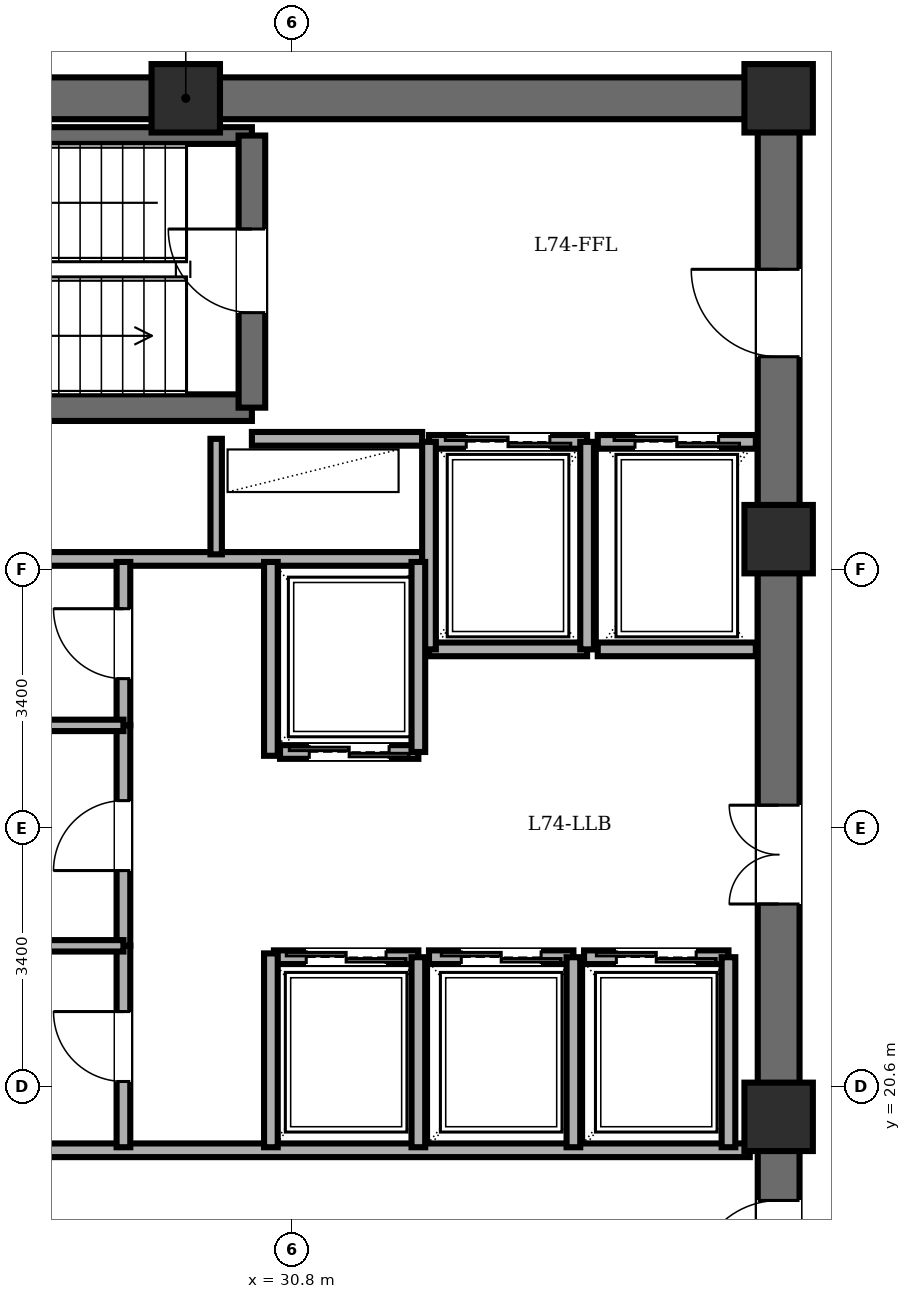
"""IFC4 building model, lengths in metres.
Left out: names, types, materials, properties, quantities, classifications, styles, units other than length and angle.
Written with IfcOpenShell. Run it as: python <this file> out.ifc"""

import sys

from ifc_helpers import new_model, si_unit, direction, frame, frame_2d, origin, origin_2d, place, context, subcontext, project, spatial, rectangle, extrude, element, fill, save


model = new_model("IFC4")
c1 = context("Model", 3, precision=1e-05, world=origin(), true_north=direction((0.0, 1.0)))
c2 = subcontext(c1, "Body", "Model", "MODEL_VIEW")
j1 = project(units=[si_unit("LENGTHUNIT", "METRE"), si_unit("PLANEANGLEUNIT", "RADIAN")], contexts=[c1])
p1 = place(None, origin())
s1 = spatial("IfcSite", under=j1, at=p1, CompositionType="ELEMENT")
p2 = place(p1, origin())
s2 = spatial("IfcBuilding", under=s1, at=p2, CompositionType="ELEMENT")
p3 = place(p2, frame((0.0, 0.0, 284.35)))
s3 = spatial("IfcBuildingStorey", under=s2, at=p3, CompositionType="ELEMENT", Elevation=284.35)
for number, where, z_axis, x_axis in (
    (1, (37.2, 20.2, 0.0), (0.0, 0.0, 1.0), (1.0, 0.0, 0.0)),
    (2, (37.2, 27.8, 0.0), (0.0, 0.0, 1.0), (1.0, 0.0, 0.0)),
    (3, (37.2, 33.6, 0.0), (0.0, 0.0, 1.0), (1.0, 0.0, 0.0)),
    (4, (29.4, 33.6, 0.0), (0.0, 0.0, 1.0), (1.0, 0.0, 0.0)),
):
    element("IfcColumn", number, at=place(p3, frame(where, z_axis=z_axis, x_axis=x_axis)), inside=s3, PredefinedType="COLUMN", context=c2, shape_type="SweptSolid", body=[
        extrude(rectangle(XDim=0.9, YDim=0.9, at=origin_2d()), origin(), (0.0, 0.0, 1.0), 3.65),
    ])
p4 = place(p3, frame((21.6, 33.6, 0.0), z_axis=(0.0, 0.0, 1.0), x_axis=(1.0, 0.0, 0.0)))
e5 = element("IfcWall", 5, at=p4, inside=s3, PredefinedType="SHEAR", context=c2, shape_type="SweptSolid", body=[
    extrude(rectangle(XDim=15.6, YDim=0.55, at=frame_2d((7.8, 0.0))), origin(), (0.0, 0.0, 1.0), 3.45),
])
p5 = place(p3, frame((37.2, 14.4, 0.0), z_axis=(0.0, 0.0, 1.0), x_axis=(0.0, 1.0, 0.0)))
e6 = element("IfcWall", 6, at=p5, inside=s3, PredefinedType="SHEAR", context=c2, shape_type="SweptSolid", body=[
    extrude(rectangle(XDim=19.2, YDim=0.55, at=frame_2d((9.6, 0.0))), origin(), (0.0, 0.0, 1.0), 3.45),
])
p6 = place(p5, frame((15.8, 0.0, 0.0)))
e7 = element("IfcOpeningElement", 7, at=p6, cuts=e6, PredefinedType="OPENING", context=c2, shape_type="SweptSolid", body=[
    extrude(rectangle(XDim=1.15, YDim=2.15, at=frame_2d((0.575, 1.075))), frame((0.0, 0.285, 0.0), z_axis=(0.0, -1.0, 0.0), x_axis=(1.0, 0.0, 0.0)), (0.0, 0.0, 1.0), 0.57),
])
p7 = place(p5, frame((3.6, 0.0, 0.0)))
e8 = element("IfcOpeningElement", 8, at=p7, cuts=e6, PredefinedType="OPENING", context=c2, shape_type="SweptSolid", body=[
    extrude(rectangle(XDim=1.1, YDim=2.15, at=frame_2d((0.55, 1.075))), frame((0.0, 0.285, 0.0), z_axis=(0.0, -1.0, 0.0), x_axis=(1.0, 0.0, 0.0)), (0.0, 0.0, 1.0), 0.57),
])
p8 = place(p5, frame((8.6, 0.0, 0.0)))
e9 = element("IfcOpeningElement", 9, at=p8, cuts=e6, PredefinedType="OPENING", context=c2, shape_type="SweptSolid", body=[
    extrude(rectangle(XDim=1.3, YDim=2.2, at=frame_2d((0.65, 1.1))), frame((0.0, 0.285, 0.0), z_axis=(0.0, -1.0, 0.0), x_axis=(1.0, 0.0, 0.0)), (0.0, 0.0, 1.0), 0.57),
])
p9 = place(p3, frame((22.48, 29.53, 0.0), z_axis=(0.0, 0.0, 1.0), x_axis=(1.0, 0.0, 0.0)))
e10 = element("IfcWall", 10, at=p9, inside=s3, PredefinedType="SOLIDWALL", context=c2, shape_type="SweptSolid", body=[
    extrude(rectangle(XDim=7.79, YDim=0.35, at=frame_2d((3.895, 0.0))), origin(), (0.0, 0.0, 1.0), 3.45),
])
p10 = place(p3, frame((22.48, 33.11, 0.0), z_axis=(0.0, 0.0, 1.0), x_axis=(1.0, 0.0, 0.0)))
e11 = element("IfcWall", 11, at=p10, inside=s3, PredefinedType="PARTITIONING", context=c2, shape_type="SweptSolid", body=[
    extrude(rectangle(XDim=7.79, YDim=0.22, at=frame_2d((3.895, 0.0))), origin(), (0.0, 0.0, 1.0), 3.45),
])
p11 = place(p3, frame((30.27, 29.53, 0.0), z_axis=(0.0, 0.0, 1.0), x_axis=(0.0, 1.0, 0.0)))
e12 = element("IfcWall", 12, at=p11, inside=s3, PredefinedType="SOLIDWALL", context=c2, shape_type="SweptSolid", body=[
    extrude(rectangle(XDim=3.58, YDim=0.35, at=frame_2d((1.79, 0.0))), origin(), (0.0, 0.0, 1.0), 3.45),
])
p12 = place(p11, frame((1.25, 0.0, 0.0)))
e13 = element("IfcOpeningElement", 13, at=p12, cuts=e12, PredefinedType="OPENING", context=c2, shape_type="SweptSolid", body=[
    extrude(rectangle(XDim=1.1, YDim=2.15, at=frame_2d((0.55, 1.075))), frame((0.0, 0.185, 0.0), z_axis=(0.0, -1.0, 0.0), x_axis=(1.0, 0.0, 0.0)), (0.0, 0.0, 1.0), 0.37),
])
p13 = place(p3, frame((30.27, 29.12, 0.0), z_axis=(0.0, 0.0, 1.0), x_axis=(1.0, 0.0, 0.0)))
e14 = element("IfcWall", 14, at=p13, inside=s3, PredefinedType="PARTITIONING", context=c2, shape_type="SweptSolid", body=[
    extrude(rectangle(XDim=2.24, YDim=0.18, at=frame_2d((1.12, 0.0))), origin(), (0.0, 0.0, 1.0), 3.45),
])
p14 = place(p3, frame((21.95, 27.54, 0.0), z_axis=(0.0, 0.0, 1.0), x_axis=(1.0, 0.0, 0.0)))
e15 = element("IfcWall", 15, at=p14, inside=s3, PredefinedType="PARTITIONING", context=c2, shape_type="SweptSolid", body=[
    extrude(rectangle(XDim=10.56, YDim=0.18, at=frame_2d((5.28, 0.0))), origin(), (0.0, 0.0, 1.0), 3.45),
])
p15 = place(p3, frame((29.8, 27.6, 0.0), z_axis=(0.0, 0.0, 1.0), x_axis=(0.0, 1.0, 0.0)))
e16 = element("IfcWall", 16, at=p15, inside=s3, PredefinedType="PARTITIONING", context=c2, shape_type="SweptSolid", body=[
    extrude(rectangle(XDim=1.52, YDim=0.15, at=frame_2d((0.76, 0.0))), origin(), (0.0, 0.0, 1.0), 3.45),
])
p16 = place(p3, frame((21.95, 19.76, 0.0), z_axis=(0.0, 0.0, 1.0), x_axis=(1.0, 0.0, 0.0)))
e17 = element("IfcWall", 17, at=p16, inside=s3, PredefinedType="PARTITIONING", context=c2, shape_type="SweptSolid", body=[
    extrude(rectangle(XDim=14.87, YDim=0.18, at=frame_2d((7.435, 0.0))), origin(), (0.0, 0.0, 1.0), 3.45),
])
p17 = place(p3, frame((32.6, 29.08, 0.0), z_axis=(0.0, 0.0, 1.0), x_axis=(1.0, 0.0, 0.0)))
e18 = element("IfcWall", 18, at=p17, inside=s3, PredefinedType="PARTITIONING", context=c2, shape_type="SweptSolid", body=[
    extrude(rectangle(XDim=2.08, YDim=0.18, at=frame_2d((1.04, 0.0))), origin(), (0.0, 0.0, 1.0), 3.45),
])
p18 = place(p17, frame((0.49, 0.0, 0.0)))
e19 = element("IfcOpeningElement", 19, at=p18, cuts=e18, PredefinedType="OPENING", context=c2, shape_type="SweptSolid", body=[
    extrude(rectangle(XDim=1.1, YDim=2.2, at=frame_2d((0.55, 1.1))), frame((0.0, 0.1, 0.0), z_axis=(0.0, -1.0, 0.0), x_axis=(1.0, 0.0, 0.0)), (0.0, 0.0, 1.0), 0.2),
])
p19 = place(p3, frame((34.68, 26.35, 0.0), z_axis=(0.0, 0.0, 1.0), x_axis=(-1.0, 0.0, 0.0)))
e20 = element("IfcWall", 20, at=p19, inside=s3, PredefinedType="PARTITIONING", context=c2, shape_type="SweptSolid", body=[
    extrude(rectangle(XDim=2.08, YDim=0.18, at=frame_2d((1.04, 0.0))), origin(), (0.0, 0.0, 1.0), 3.45),
])
for number, where, z_axis, x_axis in (
    (21, (34.68, 26.35, 0.0), (0.0, 0.0, 1.0), (0.0, 1.0, 0.0)),
    (22, (32.6, 29.08, 0.0), (0.0, 0.0, 1.0), (0.0, -1.0, 0.0)),
):
    element("IfcWall", number, at=place(p3, frame(where, z_axis=z_axis, x_axis=x_axis)), inside=s3, PredefinedType="PARTITIONING", context=c2, shape_type="SweptSolid", body=[
        extrude(rectangle(XDim=2.73, YDim=0.18, at=frame_2d((1.365, 0.0))), origin(), (0.0, 0.0, 1.0), 3.45),
    ])
p20 = place(p3, frame((34.82, 29.08, 0.0), z_axis=(0.0, 0.0, 1.0), x_axis=(1.0, 0.0, 0.0)))
e23 = element("IfcWall", 23, at=p20, inside=s3, PredefinedType="PARTITIONING", context=c2, shape_type="SweptSolid", body=[
    extrude(rectangle(XDim=2.08, YDim=0.18, at=frame_2d((1.04, 0.0))), origin(), (0.0, 0.0, 1.0), 3.45),
])
p21 = place(p20, frame((0.49, 0.0, 0.0)))
e24 = element("IfcOpeningElement", 24, at=p21, cuts=e23, PredefinedType="OPENING", context=c2, shape_type="SweptSolid", body=[
    extrude(rectangle(XDim=1.1, YDim=2.2, at=frame_2d((0.55, 1.1))), frame((0.0, 0.1, 0.0), z_axis=(0.0, -1.0, 0.0), x_axis=(1.0, 0.0, 0.0)), (0.0, 0.0, 1.0), 0.2),
])
p22 = place(p3, frame((36.9, 26.35, 0.0), z_axis=(0.0, 0.0, 1.0), x_axis=(-1.0, 0.0, 0.0)))
e25 = element("IfcWall", 25, at=p22, inside=s3, PredefinedType="PARTITIONING", context=c2, shape_type="SweptSolid", body=[
    extrude(rectangle(XDim=2.08, YDim=0.18, at=frame_2d((1.04, 0.0))), origin(), (0.0, 0.0, 1.0), 3.45),
])
p23 = place(p3, frame((32.46, 25.0, 0.0), z_axis=(0.0, 0.0, 1.0), x_axis=(-1.0, 0.0, 0.0)))
e26 = element("IfcWall", 26, at=p23, inside=s3, PredefinedType="PARTITIONING", context=c2, shape_type="SweptSolid", body=[
    extrude(rectangle(XDim=1.82, YDim=0.18, at=frame_2d((0.91, 0.0))), origin(), (0.0, 0.0, 1.0), 3.45),
])
p24 = place(p23, frame((0.385, 0.0, 0.0)))
e27 = element("IfcOpeningElement", 27, at=p24, cuts=e26, PredefinedType="OPENING", context=c2, shape_type="SweptSolid", body=[
    extrude(rectangle(XDim=1.05, YDim=2.2, at=frame_2d((0.525, 1.1))), frame((0.0, 0.1, 0.0), z_axis=(0.0, -1.0, 0.0), x_axis=(1.0, 0.0, 0.0)), (0.0, 0.0, 1.0), 0.2),
])
p25 = place(p3, frame((32.46, 25.0, 0.0), z_axis=(0.0, 0.0, 1.0), x_axis=(0.0, 1.0, 0.0)))
e28 = element("IfcWall", 28, at=p25, inside=s3, PredefinedType="PARTITIONING", context=c2, shape_type="SweptSolid", body=[
    extrude(rectangle(XDim=2.5, YDim=0.18, at=frame_2d((1.25, 0.0))), origin(), (0.0, 0.0, 1.0), 3.45),
])
p26 = place(p3, frame((30.56, 22.3, 0.0), z_axis=(0.0, 0.0, 1.0), x_axis=(1.0, 0.0, 0.0)))
e29 = element("IfcWall", 29, at=p26, inside=s3, PredefinedType="PARTITIONING", context=c2, shape_type="SweptSolid", body=[
    extrude(rectangle(XDim=1.9, YDim=0.18, at=frame_2d((0.95, 0.0))), origin(), (0.0, 0.0, 1.0), 3.45),
])
p27 = place(p26, frame((0.425, 0.0, 0.0)))
e30 = element("IfcOpeningElement", 30, at=p27, cuts=e29, PredefinedType="OPENING", context=c2, shape_type="SweptSolid", body=[
    extrude(rectangle(XDim=1.05, YDim=2.2, at=frame_2d((0.525, 1.1))), frame((0.0, 0.1, 0.0), z_axis=(0.0, -1.0, 0.0), x_axis=(1.0, 0.0, 0.0)), (0.0, 0.0, 1.0), 0.2),
])
p28 = place(p3, frame((32.46, 19.8, 0.0), z_axis=(0.0, 0.0, 1.0), x_axis=(0.0, 1.0, 0.0)))
e31 = element("IfcWall", 31, at=p28, inside=s3, PredefinedType="PARTITIONING", context=c2, shape_type="SweptSolid", body=[
    extrude(rectangle(XDim=2.5, YDim=0.18, at=frame_2d((1.25, 0.0))), origin(), (0.0, 0.0, 1.0), 3.45),
])
p29 = place(p3, frame((32.6, 22.3, 0.0), z_axis=(0.0, 0.0, 1.0), x_axis=(1.0, 0.0, 0.0)))
e32 = element("IfcWall", 32, at=p29, inside=s3, PredefinedType="PARTITIONING", context=c2, shape_type="SweptSolid", body=[
    extrude(rectangle(XDim=1.9, YDim=0.18, at=frame_2d((0.95, 0.0))), origin(), (0.0, 0.0, 1.0), 3.45),
])
p30 = place(p29, frame((0.425, 0.0, 0.0)))
e33 = element("IfcOpeningElement", 33, at=p30, cuts=e32, PredefinedType="OPENING", context=c2, shape_type="SweptSolid", body=[
    extrude(rectangle(XDim=1.05, YDim=2.2, at=frame_2d((0.525, 1.1))), frame((0.0, 0.1, 0.0), z_axis=(0.0, -1.0, 0.0), x_axis=(1.0, 0.0, 0.0)), (0.0, 0.0, 1.0), 0.2),
])
p31 = place(p3, frame((34.5, 19.8, 0.0), z_axis=(0.0, 0.0, 1.0), x_axis=(0.0, 1.0, 0.0)))
e34 = element("IfcWall", 34, at=p31, inside=s3, PredefinedType="PARTITIONING", context=c2, shape_type="SweptSolid", body=[
    extrude(rectangle(XDim=2.5, YDim=0.18, at=frame_2d((1.25, 0.0))), origin(), (0.0, 0.0, 1.0), 3.45),
])
p32 = place(p3, frame((34.64, 22.3, 0.0), z_axis=(0.0, 0.0, 1.0), x_axis=(1.0, 0.0, 0.0)))
e35 = element("IfcWall", 35, at=p32, inside=s3, PredefinedType="PARTITIONING", context=c2, shape_type="SweptSolid", body=[
    extrude(rectangle(XDim=1.9, YDim=0.18, at=frame_2d((0.95, 0.0))), origin(), (0.0, 0.0, 1.0), 3.45),
])
p33 = place(p32, frame((0.425, 0.0, 0.0)))
e36 = element("IfcOpeningElement", 36, at=p33, cuts=e35, PredefinedType="OPENING", context=c2, shape_type="SweptSolid", body=[
    extrude(rectangle(XDim=1.05, YDim=2.2, at=frame_2d((0.525, 1.1))), frame((0.0, 0.1, 0.0), z_axis=(0.0, -1.0, 0.0), x_axis=(1.0, 0.0, 0.0)), (0.0, 0.0, 1.0), 0.2),
])
p34 = place(p3, frame((36.54, 19.8, 0.0), z_axis=(0.0, 0.0, 1.0), x_axis=(0.0, 1.0, 0.0)))
e37 = element("IfcWall", 37, at=p34, inside=s3, PredefinedType="PARTITIONING", context=c2, shape_type="SweptSolid", body=[
    extrude(rectangle(XDim=2.5, YDim=0.18, at=frame_2d((1.25, 0.0))), origin(), (0.0, 0.0, 1.0), 3.45),
])
for number, where, z_axis, x_axis in (
    (38, (30.52, 24.95, 0.0), (0.0, 0.0, 1.0), (0.0, 1.0, 0.0)),
    (39, (30.52, 19.8, 0.0), (0.0, 0.0, 1.0), (0.0, 1.0, 0.0)),
):
    element("IfcWall", number, at=place(p3, frame(where, z_axis=z_axis, x_axis=x_axis)), inside=s3, PredefinedType="PARTITIONING", context=c2, shape_type="SweptSolid", body=[
        extrude(rectangle(XDim=2.55, YDim=0.18, at=frame_2d((1.275, 0.0))), origin(), (0.0, 0.0, 1.0), 3.45),
    ])
p35 = place(p3, frame((28.58, 25.35, 0.0), z_axis=(0.0, 0.0, 1.0), x_axis=(0.0, 1.0, 0.0)))
e40 = element("IfcWall", 40, at=p35, inside=s3, PredefinedType="PARTITIONING", context=c2, shape_type="SweptSolid", body=[
    extrude(rectangle(XDim=2.15, YDim=0.18, at=frame_2d((1.075, 0.0))), origin(), (0.0, 0.0, 1.0), 3.45),
])
p36 = place(p35, frame((0.615, 0.0, 0.0)))
e41 = element("IfcOpeningElement", 41, at=p36, cuts=e40, PredefinedType="OPENING", context=c2, shape_type="SweptSolid", body=[
    extrude(rectangle(XDim=0.92, YDim=2.1, at=frame_2d((0.46, 1.05))), frame((0.0, 0.1, 0.0), z_axis=(0.0, -1.0, 0.0), x_axis=(1.0, 0.0, 0.0)), (0.0, 0.0, 1.0), 0.2),
])
p37 = place(p3, frame((28.58, 22.45, 0.0), z_axis=(0.0, 0.0, 1.0), x_axis=(0.0, 1.0, 0.0)))
e42 = element("IfcWall", 42, at=p37, inside=s3, PredefinedType="PARTITIONING", context=c2, shape_type="SweptSolid", body=[
    extrude(rectangle(XDim=2.9, YDim=0.18, at=frame_2d((1.45, 0.0))), origin(), (0.0, 0.0, 1.0), 3.45),
])
p38 = place(p37, frame((0.99, 0.0, 0.0)))
e43 = element("IfcOpeningElement", 43, at=p38, cuts=e42, PredefinedType="OPENING", context=c2, shape_type="SweptSolid", body=[
    extrude(rectangle(XDim=0.92, YDim=2.1, at=frame_2d((0.46, 1.05))), frame((0.0, 0.1, 0.0), z_axis=(0.0, -1.0, 0.0), x_axis=(1.0, 0.0, 0.0)), (0.0, 0.0, 1.0), 0.2),
])
p39 = place(p3, frame((28.58, 19.8, 0.0), z_axis=(0.0, 0.0, 1.0), x_axis=(0.0, 1.0, 0.0)))
e44 = element("IfcWall", 44, at=p39, inside=s3, PredefinedType="PARTITIONING", context=c2, shape_type="SweptSolid", body=[
    extrude(rectangle(XDim=2.65, YDim=0.18, at=frame_2d((1.325, 0.0))), origin(), (0.0, 0.0, 1.0), 3.45),
])
p40 = place(p39, frame((0.865, 0.0, 0.0)))
e45 = element("IfcOpeningElement", 45, at=p40, cuts=e44, PredefinedType="OPENING", context=c2, shape_type="SweptSolid", body=[
    extrude(rectangle(XDim=0.92, YDim=2.1, at=frame_2d((0.46, 1.05))), frame((0.0, 0.1, 0.0), z_axis=(0.0, -1.0, 0.0), x_axis=(1.0, 0.0, 0.0)), (0.0, 0.0, 1.0), 0.2),
])
for number, where, z_axis, x_axis in (
    (46, (21.95, 25.35, 0.0), (0.0, 0.0, 1.0), (1.0, 0.0, 0.0)),
    (47, (21.95, 22.45, 0.0), (0.0, 0.0, 1.0), (1.0, 0.0, 0.0)),
):
    element("IfcWall", number, at=place(p3, frame(where, z_axis=z_axis, x_axis=x_axis)), inside=s3, PredefinedType="PARTITIONING", context=c2, shape_type="SweptSolid", body=[
        extrude(rectangle(XDim=6.63, YDim=0.15, at=frame_2d((3.315, 0.0))), origin(), (0.0, 0.0, 1.0), 3.45),
    ])
p41 = place(p12, origin())
e48 = element("IfcDoor", 48, at=p41, inside=s3, OperationType="SINGLE_SWING_RIGHT", PredefinedType="DOOR", context=c2, shape_type="SweptSolid", body=[
    extrude(rectangle(XDim=1.1, YDim=2.15, at=frame_2d((0.55, 1.075))), frame((0.0, 0.025, 0.0), z_axis=(0.0, -1.0, 0.0), x_axis=(1.0, 0.0, 0.0)), (0.0, 0.0, 1.0), 0.05),
])
fill(e13, e48)
p42 = place(p6, origin())
e49 = element("IfcDoor", 49, at=p42, inside=s3, OperationType="SINGLE_SWING_RIGHT", PredefinedType="DOOR", context=c2, shape_type="SweptSolid", body=[
    extrude(rectangle(XDim=1.15, YDim=2.15, at=frame_2d((0.575, 1.075))), frame((0.0, 0.025, 0.0), z_axis=(0.0, -1.0, 0.0), x_axis=(1.0, 0.0, 0.0)), (0.0, 0.0, 1.0), 0.05),
])
fill(e7, e49)
p43 = place(p7, origin())
e50 = element("IfcDoor", 50, at=p43, inside=s3, OperationType="SINGLE_SWING_LEFT", PredefinedType="DOOR", context=c2, shape_type="SweptSolid", body=[
    extrude(rectangle(XDim=1.1, YDim=2.15, at=frame_2d((0.55, 1.075))), frame((0.0, 0.025, 0.0), z_axis=(0.0, -1.0, 0.0), x_axis=(1.0, 0.0, 0.0)), (0.0, 0.0, 1.0), 0.05),
])
fill(e8, e50)
p44 = place(p18, origin())
e51 = element("IfcDoor", 51, at=p44, inside=s3, OperationType="DOUBLE_DOOR_SLIDING", PredefinedType="DOOR", context=c2, shape_type="SweptSolid", body=[
    extrude(rectangle(XDim=1.1, YDim=2.2, at=frame_2d((0.55, 1.1))), frame((0.0, 0.025, 0.0), z_axis=(0.0, -1.0, 0.0), x_axis=(1.0, 0.0, 0.0)), (0.0, 0.0, 1.0), 0.05),
])
fill(e19, e51)
p45 = place(p21, origin())
e52 = element("IfcDoor", 52, at=p45, inside=s3, OperationType="DOUBLE_DOOR_SLIDING", PredefinedType="DOOR", context=c2, shape_type="SweptSolid", body=[
    extrude(rectangle(XDim=1.1, YDim=2.2, at=frame_2d((0.55, 1.1))), frame((0.0, 0.025, 0.0), z_axis=(0.0, -1.0, 0.0), x_axis=(1.0, 0.0, 0.0)), (0.0, 0.0, 1.0), 0.05),
])
fill(e24, e52)
p46 = place(p24, origin())
e53 = element("IfcDoor", 53, at=p46, inside=s3, OperationType="DOUBLE_DOOR_SLIDING", PredefinedType="DOOR", context=c2, shape_type="SweptSolid", body=[
    extrude(rectangle(XDim=1.05, YDim=2.2, at=frame_2d((0.525, 1.1))), frame((0.0, 0.025, 0.0), z_axis=(0.0, -1.0, 0.0), x_axis=(1.0, 0.0, 0.0)), (0.0, 0.0, 1.0), 0.05),
])
fill(e27, e53)
p47 = place(p27, origin())
e54 = element("IfcDoor", 54, at=p47, inside=s3, OperationType="DOUBLE_DOOR_SLIDING", PredefinedType="DOOR", context=c2, shape_type="SweptSolid", body=[
    extrude(rectangle(XDim=1.05, YDim=2.2, at=frame_2d((0.525, 1.1))), frame((0.0, 0.025, 0.0), z_axis=(0.0, -1.0, 0.0), x_axis=(1.0, 0.0, 0.0)), (0.0, 0.0, 1.0), 0.05),
])
fill(e30, e54)
p48 = place(p30, origin())
e55 = element("IfcDoor", 55, at=p48, inside=s3, OperationType="DOUBLE_DOOR_SLIDING", PredefinedType="DOOR", context=c2, shape_type="SweptSolid", body=[
    extrude(rectangle(XDim=1.05, YDim=2.2, at=frame_2d((0.525, 1.1))), frame((0.0, 0.025, 0.0), z_axis=(0.0, -1.0, 0.0), x_axis=(1.0, 0.0, 0.0)), (0.0, 0.0, 1.0), 0.05),
])
fill(e33, e55)
p49 = place(p33, origin())
e56 = element("IfcDoor", 56, at=p49, inside=s3, OperationType="DOUBLE_DOOR_SLIDING", PredefinedType="DOOR", context=c2, shape_type="SweptSolid", body=[
    extrude(rectangle(XDim=1.05, YDim=2.2, at=frame_2d((0.525, 1.1))), frame((0.0, 0.025, 0.0), z_axis=(0.0, -1.0, 0.0), x_axis=(1.0, 0.0, 0.0)), (0.0, 0.0, 1.0), 0.05),
])
fill(e36, e56)
p50 = place(p36, origin())
e57 = element("IfcDoor", 57, at=p50, inside=s3, OperationType="SINGLE_SWING_RIGHT", PredefinedType="DOOR", context=c2, shape_type="SweptSolid", body=[
    extrude(rectangle(XDim=0.92, YDim=2.1, at=frame_2d((0.46, 1.05))), frame((0.0, 0.025, 0.0), z_axis=(0.0, -1.0, 0.0), x_axis=(1.0, 0.0, 0.0)), (0.0, 0.0, 1.0), 0.05),
])
fill(e41, e57)
p51 = place(p38, origin())
e58 = element("IfcDoor", 58, at=p51, inside=s3, OperationType="SINGLE_SWING_LEFT", PredefinedType="DOOR", context=c2, shape_type="SweptSolid", body=[
    extrude(rectangle(XDim=0.92, YDim=2.1, at=frame_2d((0.46, 1.05))), frame((0.0, 0.025, 0.0), z_axis=(0.0, -1.0, 0.0), x_axis=(1.0, 0.0, 0.0)), (0.0, 0.0, 1.0), 0.05),
])
fill(e43, e58)
p52 = place(p40, origin())
e59 = element("IfcDoor", 59, at=p52, inside=s3, OperationType="SINGLE_SWING_RIGHT", PredefinedType="DOOR", context=c2, shape_type="SweptSolid", body=[
    extrude(rectangle(XDim=0.92, YDim=2.1, at=frame_2d((0.46, 1.05))), frame((0.0, 0.025, 0.0), z_axis=(0.0, -1.0, 0.0), x_axis=(1.0, 0.0, 0.0)), (0.0, 0.0, 1.0), 0.05),
])
fill(e45, e59)
p53 = place(p8, origin())
e60 = element("IfcDoor", 60, at=p53, inside=s3, OperationType="DOUBLE_DOOR_SINGLE_SWING", PredefinedType="DOOR", context=c2, shape_type="SweptSolid", body=[
    extrude(rectangle(XDim=1.3, YDim=2.2, at=frame_2d((0.65, 1.1))), frame((0.0, 0.025, 0.0), z_axis=(0.0, -1.0, 0.0), x_axis=(1.0, 0.0, 0.0)), (0.0, 0.0, 1.0), 0.05),
])
fill(e9, e60)
save(model, sys.argv[1])
